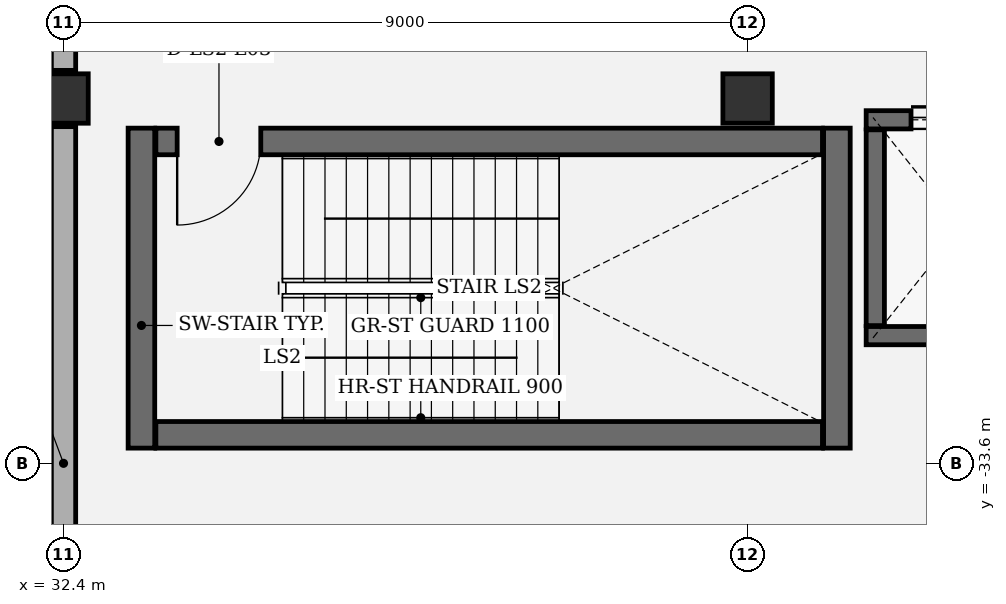
"""IFC4 building model, lengths in metres.
Left out: names, types, materials, properties, quantities, classifications, styles, units other than length and angle.
Written with IfcOpenShell. Run it as: python <this file> out.ifc"""

import sys

from ifc_helpers import new_model, si_unit, direction, frame, frame_2d, origin, origin_2d, place, context, subcontext, project, spatial, rectangle, extrude, element, fill, save


model = new_model("IFC4")
c1 = context("Model", 3, precision=1e-05, world=origin(), true_north=direction((0.0, 1.0)))
c2 = subcontext(c1, "Body", "Model", "MODEL_VIEW")
j1 = project(units=[si_unit("LENGTHUNIT", "METRE"), si_unit("PLANEANGLEUNIT", "RADIAN")], contexts=[c1])
p1 = place(None, origin())
s1 = spatial("IfcSite", under=j1, at=p1, CompositionType="ELEMENT")
p2 = place(p1, origin())
s2 = spatial("IfcBuilding", under=s1, at=p2, CompositionType="ELEMENT")
p3 = place(p2, frame((0.0, 0.0, 17.0)))
s3 = spatial("IfcBuildingStorey", under=s2, at=p3, CompositionType="ELEMENT", Elevation=17.0)
for number, where, z_axis, x_axis in (
    (1, (32.4, -28.8, 0.0), (0.0, 0.0, 1.0), (1.0, 0.0, 0.0)),
    (2, (41.4, -28.8, 0.0), (0.0, 0.0, 1.0), (1.0, 0.0, 0.0)),
):
    element("IfcColumn", number, at=place(p3, frame(where, z_axis=z_axis, x_axis=x_axis)), inside=s3, PredefinedType="COLUMN", context=c2, shape_type="SweptSolid", body=[
        extrude(rectangle(XDim=0.65, YDim=0.65, at=origin_2d()), origin(), (0.0, 0.0, 1.0), 5.0),
    ])
p4 = place(p3, frame((32.4, -38.03, 0.0), z_axis=(0.0, 0.0, 1.0), x_axis=(0.0, 1.0, 0.0)))
e3 = element("IfcWall", 3, at=p4, inside=s3, PredefinedType="SOLIDWALL", context=c2, shape_type="SweptSolid", body=[
    extrude(rectangle(XDim=8.86, YDim=0.32, at=frame_2d((4.43, 0.0))), origin(), (0.0, 0.0, 1.0), 3.937),
])
p5 = place(p3, frame((32.4, -28.43, 0.0), z_axis=(0.0, 0.0, 1.0), x_axis=(0.0, 1.0, 0.0)))
e4 = element("IfcWall", 4, at=p5, inside=s3, PredefinedType="SOLIDWALL", context=c2, shape_type="SweptSolid", body=[
    extrude(rectangle(XDim=8.86, YDim=0.32, at=frame_2d((4.43, 0.0))), origin(), (0.0, 0.0, 1.0), 3.937),
])
for number, where, z_axis, x_axis in (
    (5, (33.425, -29.19, 0.0), (0.0, 0.0, 1.0), (0.0, -1.0, 0.0)),
    (6, (42.575, -33.4, 0.0), (0.0, 0.0, 1.0), (0.0, 1.0, 0.0)),
):
    element("IfcWall", number, at=place(p3, frame(where, z_axis=z_axis, x_axis=x_axis)), inside=s3, PredefinedType="SHEAR", context=c2, shape_type="SweptSolid", body=[
        extrude(rectangle(XDim=4.21, YDim=0.35, at=frame_2d((2.105, 0.0))), origin(), (0.0, 0.0, 1.0), 4.995),
    ])
p6 = place(p3, frame((33.615, -33.225, 0.0), z_axis=(0.0, 0.0, 1.0), x_axis=(1.0, 0.0, 0.0)))
e7 = element("IfcWall", 7, at=p6, inside=s3, PredefinedType="SHEAR", context=c2, shape_type="SweptSolid", body=[
    extrude(rectangle(XDim=8.77, YDim=0.35, at=frame_2d((4.385, 0.0))), origin(), (0.0, 0.0, 1.0), 4.995),
])
p7 = place(p3, frame((42.385, -29.365, 0.0), z_axis=(0.0, 0.0, 1.0), x_axis=(-1.0, 0.0, 0.0)))
e8 = element("IfcWall", 8, at=p7, inside=s3, PredefinedType="SHEAR", context=c2, shape_type="SweptSolid", body=[
    extrude(rectangle(XDim=8.77, YDim=0.35, at=frame_2d((4.385, 0.0))), origin(), (0.0, 0.0, 1.0), 4.995),
])
p8 = place(p7, frame((7.39, 0.0, 0.0)))
e9 = element("IfcOpeningElement", 9, at=p8, cuts=e8, PredefinedType="OPENING", context=c2, shape_type="SweptSolid", body=[
    extrude(rectangle(XDim=1.1, YDim=2.2, at=frame_2d((0.55, 1.1))), frame((0.0, 0.185, 0.0), z_axis=(0.0, -1.0, 0.0), x_axis=(1.0, 0.0, 0.0)), (0.0, 0.0, 1.0), 0.37),
])
p9 = place(p3, frame((45.44, -31.92, 0.0), z_axis=(0.0, 0.0, 1.0), x_axis=(-1.0, 0.0, 0.0)))
e10 = element("IfcWall", 10, at=p9, inside=s3, PredefinedType="SHEAR", context=c2, shape_type="SweptSolid", body=[
    extrude(rectangle(XDim=2.48, YDim=0.24, at=frame_2d((1.24, 0.0))), origin(), (0.0, 0.0, 1.0), 4.74),
])
p10 = place(p3, frame((42.96, -29.08, 0.0), z_axis=(0.0, 0.0, 1.0), x_axis=(1.0, 0.0, 0.0)))
e11 = element("IfcWall", 11, at=p10, inside=s3, PredefinedType="SHEAR", context=c2, shape_type="SweptSolid", body=[
    extrude(rectangle(XDim=2.48, YDim=0.24, at=frame_2d((1.24, 0.0))), origin(), (0.0, 0.0, 1.0), 4.74),
])
p11 = place(p10, frame((0.59, 0.0, 0.0)))
e12 = element("IfcOpeningElement", 12, at=p11, cuts=e11, PredefinedType="OPENING", context=c2, shape_type="SweptSolid", body=[
    extrude(rectangle(XDim=1.3, YDim=2.3, at=frame_2d((0.65, 1.15))), frame((0.0, 0.13, 0.0), z_axis=(0.0, -1.0, 0.0), x_axis=(1.0, 0.0, 0.0)), (0.0, 0.0, 1.0), 0.26),
])
p12 = place(p3, frame((43.08, -31.788, 0.0), z_axis=(0.0, 0.0, 1.0), x_axis=(0.0, 1.0, 0.0)))
e13 = element("IfcWall", 13, at=p12, inside=s3, PredefinedType="SHEAR", context=c2, shape_type="SweptSolid", body=[
    extrude(rectangle(XDim=2.576, YDim=0.24, at=frame_2d((1.288, 0.0))), origin(), (0.0, 0.0, 1.0), 4.74),
])
p13 = place(p8, origin())
e14 = element("IfcDoor", 14, at=p13, inside=s3, OperationType="SINGLE_SWING_RIGHT", PredefinedType="DOOR", context=c2, shape_type="SweptSolid", body=[
    extrude(rectangle(XDim=1.1, YDim=2.2, at=frame_2d((0.55, 1.1))), frame((0.0, 0.025, 0.0), z_axis=(0.0, -1.0, 0.0), x_axis=(1.0, 0.0, 0.0)), (0.0, 0.0, 1.0), 0.05),
])
fill(e9, e14)
p14 = place(p11, origin())
e15 = element("IfcDoor", 15, at=p14, inside=s3, OperationType="DOUBLE_DOOR_SLIDING", PredefinedType="DOOR", context=c2, shape_type="SweptSolid", body=[
    extrude(rectangle(XDim=1.3, YDim=2.3, at=frame_2d((0.65, 1.15))), frame((0.0, 0.025, 0.0), z_axis=(0.0, -1.0, 0.0), x_axis=(1.0, 0.0, 0.0)), (0.0, 0.0, 1.0), 0.05),
])
fill(e12, e15)
save(model, sys.argv[1])
